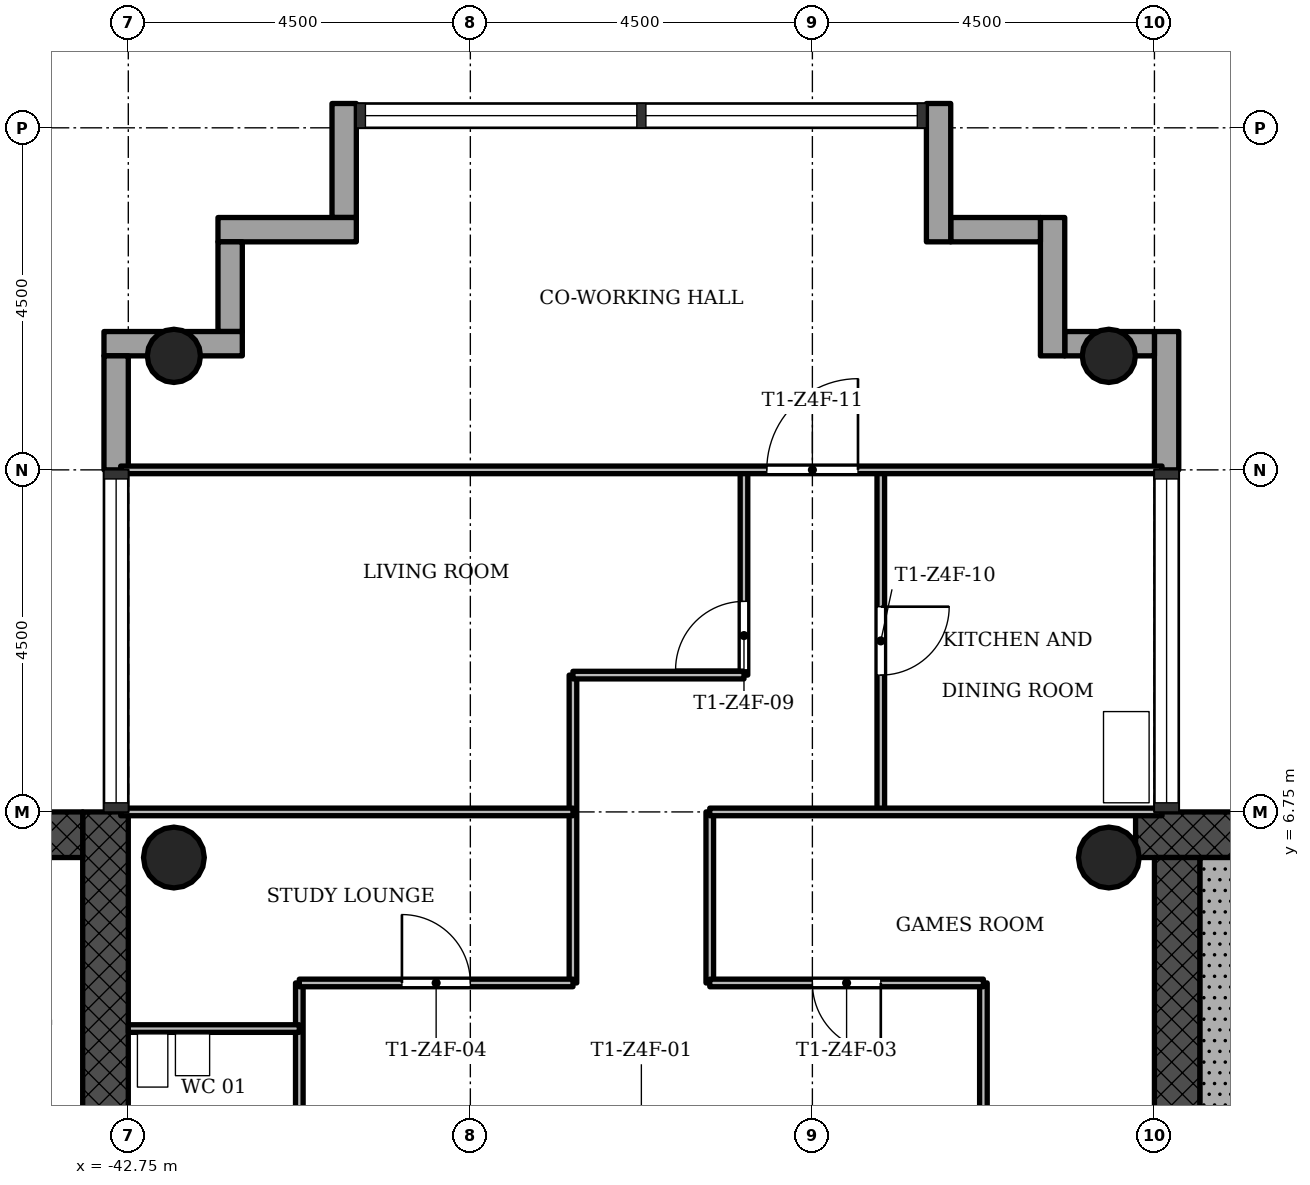
"""IFC4 building model, lengths in metres.
Left out: names, types, materials, properties, quantities, classifications, styles, units other than length and angle.
Written with IfcOpenShell. Run it as: python <this file> out.ifc"""

import sys

from ifc_helpers import new_model, si_unit, direction, frame, frame_2d, origin, origin_2d, place, context, subcontext, project, spatial, rectangle, hollow_circle, extrude, element, fill, save


model = new_model("IFC4")
c1 = context("Model", 3, precision=1e-05, world=origin(), true_north=direction((0.0, 1.0)))
c2 = subcontext(c1, "Body", "Model", "MODEL_VIEW")
j1 = project(units=[si_unit("LENGTHUNIT", "METRE"), si_unit("PLANEANGLEUNIT", "RADIAN")], contexts=[c1])
p1 = place(None, origin())
s1 = spatial("IfcSite", under=j1, at=p1, CompositionType="ELEMENT")
p2 = place(p1, origin())
s2 = spatial("IfcBuilding", under=s1, at=p2, CompositionType="ELEMENT")
p3 = place(p2, frame((0.0, 0.0, 219.8)))
s3 = spatial("IfcBuildingStorey", under=s2, at=p3, CompositionType="ELEMENT", Elevation=219.8)
p4 = place(p3, frame((-20.602, 6.45, 0.0), z_axis=(0.0, 0.0, 1.0), x_axis=(-1.0, 0.0, 0.0)))
e1 = element("IfcWall", 1, at=p4, inside=s3, PredefinedType="SHEAR", context=c2, shape_type="SweptSolid", body=[
    extrude(rectangle(XDim=8.896, YDim=0.6, at=frame_2d((4.448, 0.0))), origin(), (0.0, 0.0, 1.0), 3.4),
])
p5 = place(p3, frame((-28.95, 6.15, 0.0), z_axis=(0.0, 0.0, 1.0), x_axis=(0.0, -1.0, 0.0)))
e2 = element("IfcWall", 2, at=p5, inside=s3, PredefinedType="SHEAR", context=c2, shape_type="SweptSolid", body=[
    extrude(rectangle(XDim=12.9, YDim=0.6, at=frame_2d((6.45, 0.0))), origin(), (0.0, 0.0, 1.0), 3.4),
])
p6 = place(p5, frame((5.25, 0.0, 0.0)))
e3 = element("IfcOpeningElement", 3, at=p6, cuts=e2, PredefinedType="OPENING", context=c2, shape_type="SweptSolid", body=[
    extrude(rectangle(XDim=1.8, YDim=2.1, at=frame_2d((0.9, 1.05))), frame((0.0, 0.31, 0.0), z_axis=(0.0, -1.0, 0.0), x_axis=(1.0, 0.0, 0.0)), (0.0, 0.0, 1.0), 0.62),
])
p7 = place(p3, frame((-43.05, -6.15, 0.0), z_axis=(0.0, 0.0, 1.0), x_axis=(0.0, 1.0, 0.0)))
e4 = element("IfcWall", 4, at=p7, inside=s3, PredefinedType="SHEAR", context=c2, shape_type="SweptSolid", body=[
    extrude(rectangle(XDim=12.9, YDim=0.6, at=frame_2d((6.45, 0.0))), origin(), (0.0, 0.0, 1.0), 3.4),
])
p8 = place(p7, frame((5.25, 0.0, 0.0)))
e5 = element("IfcOpeningElement", 5, at=p8, cuts=e4, PredefinedType="OPENING", context=c2, shape_type="SweptSolid", body=[
    extrude(rectangle(XDim=1.8, YDim=2.1, at=frame_2d((0.9, 1.05))), frame((0.0, 0.31, 0.0), z_axis=(0.0, -1.0, 0.0), x_axis=(1.0, 0.0, 0.0)), (0.0, 0.0, 1.0), 0.62),
])
p9 = place(p3, frame((-43.35, 6.45, 0.0), z_axis=(0.0, 0.0, 1.0), x_axis=(-1.0, 0.0, 0.0)))
e6 = element("IfcWall", 6, at=p9, inside=s3, PredefinedType="SHEAR", context=c2, shape_type="SweptSolid", body=[
    extrude(rectangle(XDim=8.4, YDim=0.6, at=frame_2d((4.2, 0.0))), origin(), (0.0, 0.0, 1.0), 3.4),
])
for number, where, z_axis, x_axis in (
    (7, (-29.85, 12.75, 0.0), (0.0, 0.0, 1.0), (1.0, 0.0, 0.0)),
    (8, (-42.15, 12.75, 0.0), (0.0, 0.0, 1.0), (1.0, 0.0, 0.0)),
):
    element("IfcColumn", number, at=place(p3, frame(where, z_axis=z_axis, x_axis=x_axis)), inside=s3, PredefinedType="COLUMN", context=c2, shape_type="SweptSolid", body=[
        extrude(hollow_circle(Radius=0.35, WallThickness=0.025, at=origin_2d()), origin(), (0.0, 0.0, 1.0), 3.4),
    ])
for number, where, z_axis, x_axis in (
    (9, (-29.85, 6.15, 0.0), (0.0, 0.0, 1.0), (1.0, 0.0, 0.0)),
    (10, (-42.15, 6.15, 0.0), (0.0, 0.0, 1.0), (1.0, 0.0, 0.0)),
):
    element("IfcColumn", number, at=place(p3, frame(where, z_axis=z_axis, x_axis=x_axis)), inside=s3, PredefinedType="COLUMN", context=c2, shape_type="SweptSolid", body=[
        extrude(hollow_circle(Radius=0.4, WallThickness=0.028, at=origin_2d()), origin(), (0.0, 0.0, 1.0), 3.4),
    ])
p10 = place(p3, frame((-29.09, 11.25, -0.3), z_axis=(0.0, 0.0, 1.0), x_axis=(0.0, 1.0, 0.0)))
e11 = element("IfcWall", 11, at=p10, inside=s3, PredefinedType="STANDARD", context=c2, shape_type="SweptSolid", body=[
    extrude(rectangle(XDim=1.82, YDim=0.32, at=frame_2d((0.91, 0.0))), origin(), (0.0, 0.0, 1.0), 3.4),
])
p11 = place(p3, frame((-29.25, 12.91, -0.3), z_axis=(0.0, 0.0, 1.0), x_axis=(-1.0, 0.0, 0.0)))
e12 = element("IfcWall", 12, at=p11, inside=s3, PredefinedType="STANDARD", context=c2, shape_type="SweptSolid", body=[
    extrude(rectangle(XDim=1.18, YDim=0.32, at=frame_2d((0.59, 0.0))), origin(), (0.0, 0.0, 1.0), 3.4),
])
p12 = place(p3, frame((-30.59, 12.75, -0.3), z_axis=(0.0, 0.0, 1.0), x_axis=(0.0, 1.0, 0.0)))
e13 = element("IfcWall", 13, at=p12, inside=s3, PredefinedType="STANDARD", context=c2, shape_type="SweptSolid", body=[
    extrude(rectangle(XDim=1.82, YDim=0.32, at=frame_2d((0.91, 0.0))), origin(), (0.0, 0.0, 1.0), 3.4),
])
p13 = place(p3, frame((-30.75, 14.41, -0.3), z_axis=(0.0, 0.0, 1.0), x_axis=(-1.0, 0.0, 0.0)))
e14 = element("IfcWall", 14, at=p13, inside=s3, PredefinedType="STANDARD", context=c2, shape_type="SweptSolid", body=[
    extrude(rectangle(XDim=1.18, YDim=0.32, at=frame_2d((0.59, 0.0))), origin(), (0.0, 0.0, 1.0), 3.4),
])
p14 = place(p3, frame((-32.09, 14.25, -0.3), z_axis=(0.0, 0.0, 1.0), x_axis=(0.0, 1.0, 0.0)))
e15 = element("IfcWall", 15, at=p14, inside=s3, PredefinedType="STANDARD", context=c2, shape_type="SweptSolid", body=[
    extrude(rectangle(XDim=1.82, YDim=0.32, at=frame_2d((0.91, 0.0))), origin(), (0.0, 0.0, 1.0), 3.4),
])
p15 = place(p3, frame((-39.91, 16.07, -0.3), z_axis=(0.0, 0.0, 1.0), x_axis=(0.0, -1.0, 0.0)))
e16 = element("IfcWall", 16, at=p15, inside=s3, PredefinedType="STANDARD", context=c2, shape_type="SweptSolid", body=[
    extrude(rectangle(XDim=1.5, YDim=0.32, at=frame_2d((0.75, 0.0))), origin(), (0.0, 0.0, 1.0), 3.4),
])
p16 = place(p3, frame((-39.75, 14.41, -0.3), z_axis=(0.0, 0.0, 1.0), x_axis=(-1.0, 0.0, 0.0)))
e17 = element("IfcWall", 17, at=p16, inside=s3, PredefinedType="STANDARD", context=c2, shape_type="SweptSolid", body=[
    extrude(rectangle(XDim=1.82, YDim=0.32, at=frame_2d((0.91, 0.0))), origin(), (0.0, 0.0, 1.0), 3.4),
])
p17 = place(p3, frame((-41.41, 14.25, -0.3), z_axis=(0.0, 0.0, 1.0), x_axis=(0.0, -1.0, 0.0)))
e18 = element("IfcWall", 18, at=p17, inside=s3, PredefinedType="STANDARD", context=c2, shape_type="SweptSolid", body=[
    extrude(rectangle(XDim=1.18, YDim=0.32, at=frame_2d((0.59, 0.0))), origin(), (0.0, 0.0, 1.0), 3.4),
])
p18 = place(p3, frame((-41.25, 12.91, -0.3), z_axis=(0.0, 0.0, 1.0), x_axis=(-1.0, 0.0, 0.0)))
e19 = element("IfcWall", 19, at=p18, inside=s3, PredefinedType="STANDARD", context=c2, shape_type="SweptSolid", body=[
    extrude(rectangle(XDim=1.82, YDim=0.32, at=frame_2d((0.91, 0.0))), origin(), (0.0, 0.0, 1.0), 3.4),
])
p19 = place(p3, frame((-42.91, 12.75, -0.3), z_axis=(0.0, 0.0, 1.0), x_axis=(0.0, -1.0, 0.0)))
e20 = element("IfcWall", 20, at=p19, inside=s3, PredefinedType="STANDARD", context=c2, shape_type="SweptSolid", body=[
    extrude(rectangle(XDim=1.5, YDim=0.32, at=frame_2d((0.75, 0.0))), origin(), (0.0, 0.0, 1.0), 3.4),
])
p20 = place(p3, frame((-40.5, 1.5, 0.0), z_axis=(0.0, 0.0, 1.0), x_axis=(0.0, 1.0, 0.0)))
e21 = element("IfcWall", 21, at=p20, inside=s3, PredefinedType="PARTITIONING", context=c2, shape_type="SweptSolid", body=[
    extrude(rectangle(XDim=3.0, YDim=0.1, at=frame_2d((1.5, 0.0))), origin(), (0.0, 0.0, 1.0), 3.0),
])
p21 = place(p3, frame((-36.9, 4.5, 0.0), z_axis=(0.0, 0.0, 1.0), x_axis=(0.0, 1.0, 0.0)))
e22 = element("IfcWall", 22, at=p21, inside=s3, PredefinedType="PARTITIONING", context=c2, shape_type="SweptSolid", body=[
    extrude(rectangle(XDim=4.05, YDim=0.1, at=frame_2d((2.025, 0.0))), origin(), (0.0, 0.0, 1.0), 3.0),
])
p22 = place(p3, frame((-35.1, 4.5, 0.0), z_axis=(0.0, 0.0, 1.0), x_axis=(0.0, 1.0, 0.0)))
e23 = element("IfcWall", 23, at=p22, inside=s3, PredefinedType="PARTITIONING", context=c2, shape_type="SweptSolid", body=[
    extrude(rectangle(XDim=2.25, YDim=0.1, at=frame_2d((1.125, 0.0))), origin(), (0.0, 0.0, 1.0), 3.0),
])
p23 = place(p3, frame((-34.65, 8.55, 0.0), z_axis=(0.0, 0.0, 1.0), x_axis=(0.0, 1.0, 0.0)))
e24 = element("IfcWall", 24, at=p23, inside=s3, PredefinedType="PARTITIONING", context=c2, shape_type="SweptSolid", body=[
    extrude(rectangle(XDim=2.7, YDim=0.1, at=frame_2d((1.35, 0.0))), origin(), (0.0, 0.0, 1.0), 3.0),
])
p24 = place(p23, frame((0.07, 0.0, 0.0)))
e25 = element("IfcOpeningElement", 25, at=p24, cuts=e24, PredefinedType="OPENING", context=c2, shape_type="SweptSolid", body=[
    extrude(rectangle(XDim=0.9, YDim=2.1, at=frame_2d((0.45, 1.05))), frame((0.0, 0.06, 0.0), z_axis=(0.0, -1.0, 0.0), x_axis=(1.0, 0.0, 0.0)), (0.0, 0.0, 1.0), 0.12),
])
p25 = place(p3, frame((-32.85, 6.75, 0.0), z_axis=(0.0, 0.0, 1.0), x_axis=(0.0, 1.0, 0.0)))
e26 = element("IfcWall", 26, at=p25, inside=s3, PredefinedType="PARTITIONING", context=c2, shape_type="SweptSolid", body=[
    extrude(rectangle(XDim=4.5, YDim=0.1, at=frame_2d((2.25, 0.0))), origin(), (0.0, 0.0, 1.0), 3.0),
])
p26 = place(p25, frame((1.8, 0.0, 0.0)))
e27 = element("IfcOpeningElement", 27, at=p26, cuts=e26, PredefinedType="OPENING", context=c2, shape_type="SweptSolid", body=[
    extrude(rectangle(XDim=0.9, YDim=2.1, at=frame_2d((0.45, 1.05))), frame((0.0, 0.06, 0.0), z_axis=(0.0, -1.0, 0.0), x_axis=(1.0, 0.0, 0.0)), (0.0, 0.0, 1.0), 0.12),
])
p27 = place(p3, frame((-31.5, 1.5, 0.0), z_axis=(0.0, 0.0, 1.0), x_axis=(0.0, 1.0, 0.0)))
e28 = element("IfcWall", 28, at=p27, inside=s3, PredefinedType="PARTITIONING", context=c2, shape_type="SweptSolid", body=[
    extrude(rectangle(XDim=3.0, YDim=0.1, at=frame_2d((1.5, 0.0))), origin(), (0.0, 0.0, 1.0), 3.0),
])
p28 = place(p3, frame((-42.75, 3.9, 0.0), z_axis=(0.0, 0.0, 1.0), x_axis=(1.0, 0.0, 0.0)))
e29 = element("IfcWall", 29, at=p28, inside=s3, PredefinedType="PARTITIONING", context=c2, shape_type="SweptSolid", body=[
    extrude(rectangle(XDim=2.25, YDim=0.1, at=frame_2d((1.125, 0.0))), origin(), (0.0, 0.0, 1.0), 3.0),
])
p29 = place(p3, frame((-40.5, 4.5, 0.0), z_axis=(0.0, 0.0, 1.0), x_axis=(1.0, 0.0, 0.0)))
e30 = element("IfcWall", 30, at=p29, inside=s3, PredefinedType="PARTITIONING", context=c2, shape_type="SweptSolid", body=[
    extrude(rectangle(XDim=3.6, YDim=0.1, at=frame_2d((1.8, 0.0))), origin(), (0.0, 0.0, 1.0), 3.0),
])
p30 = place(p29, frame((1.35, 0.0, 0.0)))
e31 = element("IfcOpeningElement", 31, at=p30, cuts=e30, PredefinedType="OPENING", context=c2, shape_type="SweptSolid", body=[
    extrude(rectangle(XDim=0.9, YDim=2.1, at=frame_2d((0.45, 1.05))), frame((0.0, 0.06, 0.0), z_axis=(0.0, -1.0, 0.0), x_axis=(1.0, 0.0, 0.0)), (0.0, 0.0, 1.0), 0.12),
])
p31 = place(p3, frame((-35.1, 4.5, 0.0), z_axis=(0.0, 0.0, 1.0), x_axis=(1.0, 0.0, 0.0)))
e32 = element("IfcWall", 32, at=p31, inside=s3, PredefinedType="PARTITIONING", context=c2, shape_type="SweptSolid", body=[
    extrude(rectangle(XDim=3.6, YDim=0.1, at=frame_2d((1.8, 0.0))), origin(), (0.0, 0.0, 1.0), 3.0),
])
p32 = place(p31, frame((1.35, 0.0, 0.0)))
e33 = element("IfcOpeningElement", 33, at=p32, cuts=e32, PredefinedType="OPENING", context=c2, shape_type="SweptSolid", body=[
    extrude(rectangle(XDim=0.9, YDim=2.1, at=frame_2d((0.45, 1.05))), frame((0.0, 0.06, 0.0), z_axis=(0.0, -1.0, 0.0), x_axis=(1.0, 0.0, 0.0)), (0.0, 0.0, 1.0), 0.12),
])
for number, where, z_axis, x_axis in (
    (34, (-42.85, 6.75, 0.0), (0.0, 0.0, 1.0), (1.0, 0.0, 0.0)),
    (35, (-35.1, 6.75, 0.0), (0.0, 0.0, 1.0), (1.0, 0.0, 0.0)),
):
    element("IfcWall", number, at=place(p3, frame(where, z_axis=z_axis, x_axis=x_axis)), inside=s3, PredefinedType="PARTITIONING", context=c2, shape_type="SweptSolid", body=[
        extrude(rectangle(XDim=5.95, YDim=0.1, at=frame_2d((2.975, 0.0))), origin(), (0.0, 0.0, 1.0), 3.0),
    ])
p33 = place(p3, frame((-36.9, 8.55, 0.0), z_axis=(0.0, 0.0, 1.0), x_axis=(1.0, 0.0, 0.0)))
e36 = element("IfcWall", 36, at=p33, inside=s3, PredefinedType="PARTITIONING", context=c2, shape_type="SweptSolid", body=[
    extrude(rectangle(XDim=2.25, YDim=0.1, at=frame_2d((1.125, 0.0))), origin(), (0.0, 0.0, 1.0), 3.0),
])
p34 = place(p3, frame((-42.85, 11.25, 0.0), z_axis=(0.0, 0.0, 1.0), x_axis=(1.0, 0.0, 0.0)))
e37 = element("IfcWall", 37, at=p34, inside=s3, PredefinedType="PARTITIONING", context=c2, shape_type="SweptSolid", body=[
    extrude(rectangle(XDim=13.7, YDim=0.1, at=frame_2d((6.85, 0.0))), origin(), (0.0, 0.0, 1.0), 3.0),
])
p35 = place(p34, frame((8.5, 0.0, 0.0)))
e38 = element("IfcOpeningElement", 38, at=p35, cuts=e37, PredefinedType="OPENING", context=c2, shape_type="SweptSolid", body=[
    extrude(rectangle(XDim=1.2, YDim=2.1, at=frame_2d((0.6, 1.05))), frame((0.0, 0.06, 0.0), z_axis=(0.0, -1.0, 0.0), x_axis=(1.0, 0.0, 0.0)), (0.0, 0.0, 1.0), 0.12),
])
p36 = place(p3, frame((-28.35, 1.85, 0.0), z_axis=(0.0, 0.0, 1.0), x_axis=(0.0, 1.0, 0.0)))
e39 = element("IfcWall", 39, at=p36, inside=s3, PredefinedType="SHEAR", context=c2, shape_type="SweptSolid", body=[
    extrude(rectangle(XDim=4.3, YDim=0.6, at=frame_2d((2.15, 0.0))), origin(), (0.0, 0.0, 1.0), 3.4),
])
p37 = place(p32, origin())
e40 = element("IfcDoor", 40, at=p37, inside=s3, OperationType="SINGLE_SWING_RIGHT", PredefinedType="DOOR", context=c2, shape_type="SweptSolid", body=[
    extrude(rectangle(XDim=0.9, YDim=2.1, at=frame_2d((0.45, 1.05))), frame((0.0, 0.025, 0.0), z_axis=(0.0, -1.0, 0.0), x_axis=(1.0, 0.0, 0.0)), (0.0, 0.0, 1.0), 0.05),
])
fill(e33, e40)
p38 = place(p30, origin())
e41 = element("IfcDoor", 41, at=p38, inside=s3, OperationType="SINGLE_SWING_RIGHT", PredefinedType="DOOR", context=c2, shape_type="SweptSolid", body=[
    extrude(rectangle(XDim=0.9, YDim=2.1, at=frame_2d((0.45, 1.05))), frame((0.0, 0.025, 0.0), z_axis=(0.0, -1.0, 0.0), x_axis=(1.0, 0.0, 0.0)), (0.0, 0.0, 1.0), 0.05),
])
fill(e31, e41)
p39 = place(p24, origin())
e42 = element("IfcDoor", 42, at=p39, inside=s3, OperationType="SINGLE_SWING_RIGHT", PredefinedType="DOOR", context=c2, shape_type="SweptSolid", body=[
    extrude(rectangle(XDim=0.9, YDim=2.1, at=frame_2d((0.45, 1.05))), frame((0.0, 0.025, 0.0), z_axis=(0.0, -1.0, 0.0), x_axis=(1.0, 0.0, 0.0)), (0.0, 0.0, 1.0), 0.05),
])
fill(e25, e42)
p40 = place(p26, origin())
e43 = element("IfcDoor", 43, at=p40, inside=s3, OperationType="SINGLE_SWING_RIGHT", PredefinedType="DOOR", context=c2, shape_type="SweptSolid", body=[
    extrude(rectangle(XDim=0.9, YDim=2.1, at=frame_2d((0.45, 1.05))), frame((0.0, 0.025, 0.0), z_axis=(0.0, -1.0, 0.0), x_axis=(1.0, 0.0, 0.0)), (0.0, 0.0, 1.0), 0.05),
])
fill(e27, e43)
p41 = place(p35, origin())
e44 = element("IfcDoor", 44, at=p41, inside=s3, OperationType="SINGLE_SWING_LEFT", PredefinedType="DOOR", context=c2, shape_type="SweptSolid", body=[
    extrude(rectangle(XDim=1.2, YDim=2.1, at=frame_2d((0.6, 1.05))), frame((0.0, 0.025, 0.0), z_axis=(0.0, -1.0, 0.0), x_axis=(1.0, 0.0, 0.0)), (0.0, 0.0, 1.0), 0.05),
])
fill(e38, e44)
save(model, sys.argv[1])
